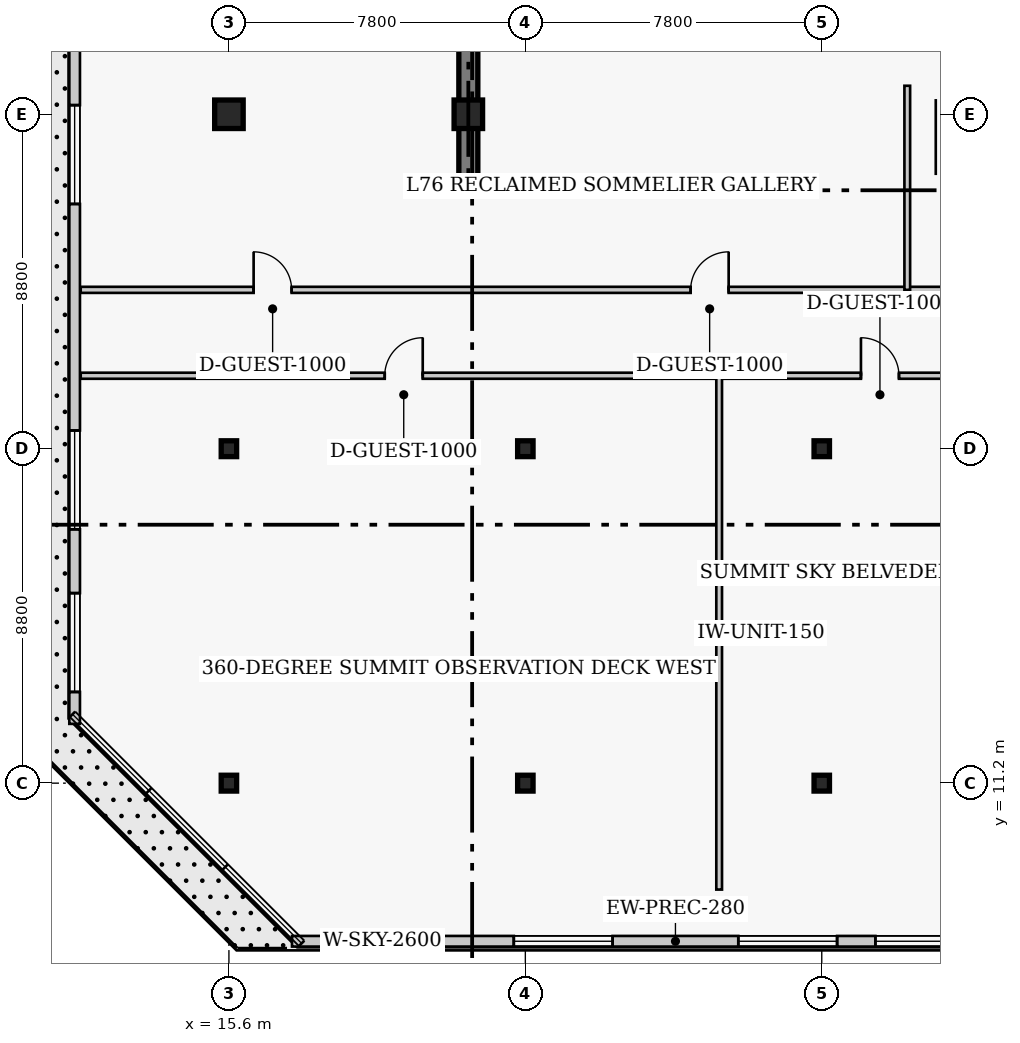
"""IFC4 building model, lengths in metres.
Left out: names, types, materials, properties, quantities, classifications, styles, units other than length and angle.
Written with IfcOpenShell. Run it as: python <this file> out.ifc"""

import sys

from ifc_helpers import new_model, si_unit, direction, frame, frame_2d, origin, origin_2d, place, context, subcontext, project, spatial, rectangle, i_section, extrude, element, fill, save


model = new_model("IFC4")
c1 = context("Model", 3, precision=1e-05, world=origin(), true_north=direction((0.0, 1.0)))
c2 = subcontext(c1, "Body", "Model", "MODEL_VIEW")
j1 = project(units=[si_unit("LENGTHUNIT", "METRE"), si_unit("PLANEANGLEUNIT", "RADIAN")], contexts=[c1])
p1 = place(None, origin())
s1 = spatial("IfcSite", under=j1, at=p1, CompositionType="ELEMENT")
p2 = place(p1, origin())
s2 = spatial("IfcBuilding", under=s1, at=p2, CompositionType="ELEMENT")
p3 = place(p2, frame((0.0, 0.0, 306.6)))
s3 = spatial("IfcBuildingStorey", under=s2, at=p3, CompositionType="ELEMENT", Elevation=306.6)
p4 = place(p3, frame((21.9, 27.05, 0.0), z_axis=(0.0, 0.0, 1.0), x_axis=(0.0, 1.0, 0.0)))
e1 = element("IfcWall", 1, at=p4, inside=s3, PredefinedType="SHEAR", context=c2, shape_type="SweptSolid", body=[
    extrude(rectangle(XDim=13.52, YDim=0.5, at=frame_2d((6.76, 0.0))), origin(), (0.0, 0.0, 1.0), 4.8),
])
for number, where, z_axis, x_axis in (
    (2, (15.6, 11.2, 0.0), (0.0, 0.0, 1.0), (1.0, 0.0, 0.0)),
    (3, (15.6, 20.0, 0.0), (0.0, 0.0, 1.0), (1.0, 0.0, 0.0)),
):
    element("IfcColumn", number, at=place(p3, frame(where, z_axis=z_axis, x_axis=x_axis)), inside=s3, PredefinedType="COLUMN", context=c2, shape_type="SweptSolid", body=[
        extrude(i_section(OverallWidth=0.406, OverallDepth=0.417, WebThickness=0.03, FlangeThickness=0.048, FilletRadius=0.017, at=origin_2d()), origin(), (0.0, 0.0, 1.0), 4.8),
    ])
p5 = place(p3, frame((15.6, 28.8, 0.0), z_axis=(0.0, 0.0, 1.0), x_axis=(1.0, 0.0, 0.0)))
e4 = element("IfcColumn", 4, at=p5, inside=s3, PredefinedType="COLUMN", context=c2, shape_type="SweptSolid", body=[
    extrude(rectangle(XDim=0.75, YDim=0.75, at=origin_2d()), origin(), (0.0, 0.0, 1.0), 4.8),
])
for number, where, z_axis, x_axis in (
    (5, (23.4, 11.2, 0.0), (0.0, 0.0, 1.0), (1.0, 0.0, 0.0)),
    (6, (23.4, 20.0, 0.0), (0.0, 0.0, 1.0), (1.0, 0.0, 0.0)),
    (7, (31.2, 11.2, 0.0), (0.0, 0.0, 1.0), (1.0, 0.0, 0.0)),
    (8, (31.2, 20.0, 0.0), (0.0, 0.0, 1.0), (1.0, 0.0, 0.0)),
):
    element("IfcColumn", number, at=place(p3, frame(where, z_axis=z_axis, x_axis=x_axis)), inside=s3, PredefinedType="COLUMN", context=c2, shape_type="SweptSolid", body=[
        extrude(i_section(OverallWidth=0.406, OverallDepth=0.417, WebThickness=0.03, FlangeThickness=0.048, FilletRadius=0.017, at=origin_2d()), origin(), (0.0, 0.0, 1.0), 4.8),
    ])
p6 = place(p3, frame((21.9, 28.8, 0.0), z_axis=(0.0, 0.0, 1.0), x_axis=(1.0, 0.0, 0.0)))
e9 = element("IfcColumn", 9, at=p6, inside=s3, PredefinedType="COLUMN", context=c2, shape_type="SweptSolid", body=[
    extrude(rectangle(XDim=0.75, YDim=0.75, at=origin_2d()), origin(), (0.0, 0.0, 1.0), 4.8),
])
p7 = place(p3, frame((17.26, 7.04, 0.0), z_axis=(0.0, 0.0, 1.0), x_axis=(1.0, 0.0, 0.0)))
e10 = element("IfcWall", 10, at=p7, inside=s3, PredefinedType="SOLIDWALL", context=c2, shape_type="SweptSolid", body=[
    extrude(rectangle(XDim=19.03, YDim=0.28, at=frame_2d((9.515, 0.0))), origin(), (0.0, 0.0, 1.0), 4.45),
])
p8 = place(p7, frame((1.079, 0.0, 0.65)))
e11 = element("IfcOpeningElement", 11, at=p8, cuts=e10, PredefinedType="OPENING", context=c2, shape_type="SweptSolid", body=[
    extrude(rectangle(XDim=2.6, YDim=2.2, at=frame_2d((1.3, 1.1))), frame((0.0, 0.15, 0.0), z_axis=(0.0, -1.0, 0.0), x_axis=(1.0, 0.0, 0.0)), (0.0, 0.0, 1.0), 0.3),
])
p9 = place(p7, frame((5.836, 0.0, 0.65)))
e12 = element("IfcOpeningElement", 12, at=p9, cuts=e10, PredefinedType="OPENING", context=c2, shape_type="SweptSolid", body=[
    extrude(rectangle(XDim=2.6, YDim=2.2, at=frame_2d((1.3, 1.1))), frame((0.0, 0.15, 0.0), z_axis=(0.0, -1.0, 0.0), x_axis=(1.0, 0.0, 0.0)), (0.0, 0.0, 1.0), 0.3),
])
p10 = place(p7, frame((11.744, 0.0, 0.65)))
e13 = element("IfcOpeningElement", 13, at=p10, cuts=e10, PredefinedType="OPENING", context=c2, shape_type="SweptSolid", body=[
    extrude(rectangle(XDim=2.6, YDim=2.2, at=frame_2d((1.3, 1.1))), frame((0.0, 0.15, 0.0), z_axis=(0.0, -1.0, 0.0), x_axis=(1.0, 0.0, 0.0)), (0.0, 0.0, 1.0), 0.3),
])
p11 = place(p7, frame((15.351, 0.0, 0.65)))
e14 = element("IfcOpeningElement", 14, at=p11, cuts=e10, PredefinedType="OPENING", context=c2, shape_type="SweptSolid", body=[
    extrude(rectangle(XDim=2.6, YDim=2.2, at=frame_2d((1.3, 1.1))), frame((0.0, 0.15, 0.0), z_axis=(0.0, -1.0, 0.0), x_axis=(1.0, 0.0, 0.0)), (0.0, 0.0, 1.0), 0.3),
])
p12 = place(p3, frame((11.54, 38.44, 0.0), z_axis=(0.0, 0.0, 1.0), x_axis=(0.0, -1.0, 0.0)))
e15 = element("IfcWall", 15, at=p12, inside=s3, PredefinedType="SOLIDWALL", context=c2, shape_type="SweptSolid", body=[
    extrude(rectangle(XDim=25.68, YDim=0.28, at=frame_2d((12.84, 0.0))), origin(), (0.0, 0.0, 1.0), 4.45),
])
p13 = place(p12, frame((0.84, 0.0, 0.65)))
e16 = element("IfcOpeningElement", 16, at=p13, cuts=e15, PredefinedType="OPENING", context=c2, shape_type="SweptSolid", body=[
    extrude(rectangle(XDim=2.6, YDim=2.2, at=frame_2d((1.3, 1.1))), frame((0.0, 0.15, 0.0), z_axis=(0.0, -1.0, 0.0), x_axis=(1.0, 0.0, 0.0)), (0.0, 0.0, 1.0), 0.3),
])
p14 = place(p12, frame((5.12, 0.0, 0.65)))
e17 = element("IfcOpeningElement", 17, at=p14, cuts=e15, PredefinedType="OPENING", context=c2, shape_type="SweptSolid", body=[
    extrude(rectangle(XDim=2.6, YDim=2.2, at=frame_2d((1.3, 1.1))), frame((0.0, 0.15, 0.0), z_axis=(0.0, -1.0, 0.0), x_axis=(1.0, 0.0, 0.0)), (0.0, 0.0, 1.0), 0.3),
])
p15 = place(p12, frame((9.4, 0.0, 0.65)))
e18 = element("IfcOpeningElement", 18, at=p15, cuts=e15, PredefinedType="OPENING", context=c2, shape_type="SweptSolid", body=[
    extrude(rectangle(XDim=2.6, YDim=2.2, at=frame_2d((1.3, 1.1))), frame((0.0, 0.15, 0.0), z_axis=(0.0, -1.0, 0.0), x_axis=(1.0, 0.0, 0.0)), (0.0, 0.0, 1.0), 0.3),
])
p16 = place(p12, frame((17.96, 0.0, 0.65)))
e19 = element("IfcOpeningElement", 19, at=p16, cuts=e15, PredefinedType="OPENING", context=c2, shape_type="SweptSolid", body=[
    extrude(rectangle(XDim=2.6, YDim=2.2, at=frame_2d((1.3, 1.1))), frame((0.0, 0.15, 0.0), z_axis=(0.0, -1.0, 0.0), x_axis=(1.0, 0.0, 0.0)), (0.0, 0.0, 1.0), 0.3),
])
p17 = place(p12, frame((22.24, 0.0, 0.65)))
e20 = element("IfcOpeningElement", 20, at=p17, cuts=e15, PredefinedType="OPENING", context=c2, shape_type="SweptSolid", body=[
    extrude(rectangle(XDim=2.6, YDim=2.2, at=frame_2d((1.3, 1.1))), frame((0.0, 0.15, 0.0), z_axis=(0.0, -1.0, 0.0), x_axis=(1.0, 0.0, 0.0)), (0.0, 0.0, 1.0), 0.3),
])
p18 = place(p3, frame((11.7, 21.92, 0.0), z_axis=(0.0, 0.0, 1.0), x_axis=(1.0, 0.0, 0.0)))
e21 = element("IfcWall", 21, at=p18, inside=s3, PredefinedType="PARTITIONING", context=c2, shape_type="SweptSolid", body=[
    extrude(rectangle(XDim=54.6, YDim=0.16, at=frame_2d((27.3, 0.0))), origin(), (0.0, 0.0, 1.0), 4.45),
])
p19 = place(p18, frame((8.0, 0.0, 0.0)))
e22 = element("IfcOpeningElement", 22, at=p19, cuts=e21, PredefinedType="OPENING", context=c2, shape_type="SweptSolid", body=[
    extrude(rectangle(XDim=1.0, YDim=2.15, at=frame_2d((0.5, 1.075))), frame((0.0, 0.09, 0.0), z_axis=(0.0, -1.0, 0.0), x_axis=(1.0, 0.0, 0.0)), (0.0, 0.0, 1.0), 0.18),
])
p20 = place(p18, frame((20.531, 0.0, 0.0)))
e23 = element("IfcOpeningElement", 23, at=p20, cuts=e21, PredefinedType="OPENING", context=c2, shape_type="SweptSolid", body=[
    extrude(rectangle(XDim=1.0, YDim=2.15, at=frame_2d((0.5, 1.075))), frame((0.0, 0.09, 0.0), z_axis=(0.0, -1.0, 0.0), x_axis=(1.0, 0.0, 0.0)), (0.0, 0.0, 1.0), 0.18),
])
p21 = place(p18, frame((36.569, 0.0, 0.0)))
e24 = element("IfcOpeningElement", 24, at=p21, cuts=e21, PredefinedType="OPENING", context=c2, shape_type="SweptSolid", body=[
    extrude(rectangle(XDim=1.0, YDim=2.15, at=frame_2d((0.5, 1.075))), frame((0.0, 0.09, 0.0), z_axis=(0.0, -1.0, 0.0), x_axis=(1.0, 0.0, 0.0)), (0.0, 0.0, 1.0), 0.18),
])
p22 = place(p3, frame((11.7, 24.18, 0.0), z_axis=(0.0, 0.0, 1.0), x_axis=(1.0, 0.0, 0.0)))
e25 = element("IfcWall", 25, at=p22, inside=s3, PredefinedType="PARTITIONING", context=c2, shape_type="SweptSolid", body=[
    extrude(rectangle(XDim=54.6, YDim=0.16, at=frame_2d((27.3, 0.0))), origin(), (0.0, 0.0, 1.0), 4.45),
])
p23 = place(p22, frame((25.4, 0.0, 0.0)))
e26 = element("IfcOpeningElement", 26, at=p23, cuts=e25, PredefinedType="OPENING", context=c2, shape_type="SweptSolid", body=[
    extrude(rectangle(XDim=1.8, YDim=2.2, at=frame_2d((0.9, 1.1))), frame((0.0, 0.09, 0.0), z_axis=(0.0, -1.0, 0.0), x_axis=(1.0, 0.0, 0.0)), (0.0, 0.0, 1.0), 0.18),
])
p24 = place(p22, frame((16.05, 0.0, 0.0)))
e27 = element("IfcOpeningElement", 27, at=p24, cuts=e25, PredefinedType="OPENING", context=c2, shape_type="SweptSolid", body=[
    extrude(rectangle(XDim=1.0, YDim=2.15, at=frame_2d((0.5, 1.075))), frame((0.0, 0.09, 0.0), z_axis=(0.0, -1.0, 0.0), x_axis=(1.0, 0.0, 0.0)), (0.0, 0.0, 1.0), 0.18),
])
p25 = place(p22, frame((33.3, 0.0, 0.0)))
e28 = element("IfcOpeningElement", 28, at=p25, cuts=e25, PredefinedType="OPENING", context=c2, shape_type="SweptSolid", body=[
    extrude(rectangle(XDim=1.0, YDim=2.15, at=frame_2d((0.5, 1.075))), frame((0.0, 0.09, 0.0), z_axis=(0.0, -1.0, 0.0), x_axis=(1.0, 0.0, 0.0)), (0.0, 0.0, 1.0), 0.18),
])
p26 = place(p22, frame((4.55, 0.0, 0.0)))
e29 = element("IfcOpeningElement", 29, at=p26, cuts=e25, PredefinedType="OPENING", context=c2, shape_type="SweptSolid", body=[
    extrude(rectangle(XDim=1.0, YDim=2.15, at=frame_2d((0.5, 1.075))), frame((0.0, 0.09, 0.0), z_axis=(0.0, -1.0, 0.0), x_axis=(1.0, 0.0, 0.0)), (0.0, 0.0, 1.0), 0.18),
])
p27 = place(p22, frame((46.91, 0.0, 0.0)))
e30 = element("IfcOpeningElement", 30, at=p27, cuts=e25, PredefinedType="OPENING", context=c2, shape_type="SweptSolid", body=[
    extrude(rectangle(XDim=0.88, YDim=2.05, at=frame_2d((0.44, 1.025))), frame((0.0, 0.09, 0.0), z_axis=(0.0, -1.0, 0.0), x_axis=(1.0, 0.0, 0.0)), (0.0, 0.0, 1.0), 0.18),
])
p28 = place(p22, frame((49.15, 0.0, 0.0)))
e31 = element("IfcOpeningElement", 31, at=p28, cuts=e25, PredefinedType="OPENING", context=c2, shape_type="SweptSolid", body=[
    extrude(rectangle(XDim=1.0, YDim=2.15, at=frame_2d((0.5, 1.075))), frame((0.0, 0.09, 0.0), z_axis=(0.0, -1.0, 0.0), x_axis=(1.0, 0.0, 0.0)), (0.0, 0.0, 1.0), 0.18),
])
p29 = place(p3, frame((33.45, 24.18, 0.0), z_axis=(0.0, 0.0, 1.0), x_axis=(0.0, 1.0, 0.0)))
e32 = element("IfcWall", 32, at=p29, inside=s3, PredefinedType="PARTITIONING", context=c2, shape_type="SweptSolid", body=[
    extrude(rectangle(XDim=5.37, YDim=0.15, at=frame_2d((2.685, 0.0))), origin(), (0.0, 0.0, 1.0), 4.45),
])
p30 = place(p3, frame((28.5, 8.4, 0.0), z_axis=(0.0, 0.0, 1.0), x_axis=(0.0, 1.0, 0.0)))
e33 = element("IfcWall", 33, at=p30, inside=s3, PredefinedType="PARTITIONING", context=c2, shape_type="SweptSolid", body=[
    extrude(rectangle(XDim=13.52, YDim=0.15, at=frame_2d((6.76, 0.0))), origin(), (0.0, 0.0, 1.0), 4.45),
])
p31 = place(p8, origin())
e34 = element("IfcWindow", 34, at=p31, inside=s3, PartitioningType="SINGLE_PANEL", PredefinedType="WINDOW", context=c2, shape_type="SweptSolid", body=[
    extrude(rectangle(XDim=2.6, YDim=2.2, at=frame_2d((1.3, 1.1))), frame((0.0, 0.03, 0.0), z_axis=(0.0, -1.0, 0.0), x_axis=(1.0, 0.0, 0.0)), (0.0, 0.0, 1.0), 0.06),
])
fill(e11, e34)
p32 = place(p9, origin())
e35 = element("IfcWindow", 35, at=p32, inside=s3, PartitioningType="SINGLE_PANEL", PredefinedType="WINDOW", context=c2, shape_type="SweptSolid", body=[
    extrude(rectangle(XDim=2.6, YDim=2.2, at=frame_2d((1.3, 1.1))), frame((0.0, 0.03, 0.0), z_axis=(0.0, -1.0, 0.0), x_axis=(1.0, 0.0, 0.0)), (0.0, 0.0, 1.0), 0.06),
])
fill(e12, e35)
p33 = place(p10, origin())
e36 = element("IfcWindow", 36, at=p33, inside=s3, PartitioningType="SINGLE_PANEL", PredefinedType="WINDOW", context=c2, shape_type="SweptSolid", body=[
    extrude(rectangle(XDim=2.6, YDim=2.2, at=frame_2d((1.3, 1.1))), frame((0.0, 0.03, 0.0), z_axis=(0.0, -1.0, 0.0), x_axis=(1.0, 0.0, 0.0)), (0.0, 0.0, 1.0), 0.06),
])
fill(e13, e36)
p34 = place(p11, origin())
e37 = element("IfcWindow", 37, at=p34, inside=s3, PartitioningType="SINGLE_PANEL", PredefinedType="WINDOW", context=c2, shape_type="SweptSolid", body=[
    extrude(rectangle(XDim=2.6, YDim=2.2, at=frame_2d((1.3, 1.1))), frame((0.0, 0.03, 0.0), z_axis=(0.0, -1.0, 0.0), x_axis=(1.0, 0.0, 0.0)), (0.0, 0.0, 1.0), 0.06),
])
fill(e14, e37)
p35 = place(p15, origin())
e38 = element("IfcWindow", 38, at=p35, inside=s3, PartitioningType="SINGLE_PANEL", PredefinedType="WINDOW", context=c2, shape_type="SweptSolid", body=[
    extrude(rectangle(XDim=2.6, YDim=2.2, at=frame_2d((1.3, 1.1))), frame((0.0, 0.03, 0.0), z_axis=(0.0, -1.0, 0.0), x_axis=(1.0, 0.0, 0.0)), (0.0, 0.0, 1.0), 0.06),
])
fill(e18, e38)
p36 = place(p16, origin())
e39 = element("IfcWindow", 39, at=p36, inside=s3, PartitioningType="SINGLE_PANEL", PredefinedType="WINDOW", context=c2, shape_type="SweptSolid", body=[
    extrude(rectangle(XDim=2.6, YDim=2.2, at=frame_2d((1.3, 1.1))), frame((0.0, 0.03, 0.0), z_axis=(0.0, -1.0, 0.0), x_axis=(1.0, 0.0, 0.0)), (0.0, 0.0, 1.0), 0.06),
])
fill(e19, e39)
p37 = place(p17, origin())
e40 = element("IfcWindow", 40, at=p37, inside=s3, PartitioningType="SINGLE_PANEL", PredefinedType="WINDOW", context=c2, shape_type="SweptSolid", body=[
    extrude(rectangle(XDim=2.6, YDim=2.2, at=frame_2d((1.3, 1.1))), frame((0.0, 0.03, 0.0), z_axis=(0.0, -1.0, 0.0), x_axis=(1.0, 0.0, 0.0)), (0.0, 0.0, 1.0), 0.06),
])
fill(e20, e40)
p38 = place(p24, origin())
e41 = element("IfcDoor", 41, at=p38, inside=s3, OperationType="SINGLE_SWING_RIGHT", PredefinedType="DOOR", context=c2, shape_type="SweptSolid", body=[
    extrude(rectangle(XDim=1.0, YDim=2.15, at=frame_2d((0.5, 1.075))), frame((0.0, 0.025, 0.0), z_axis=(0.0, -1.0, 0.0), x_axis=(1.0, 0.0, 0.0)), (0.0, 0.0, 1.0), 0.05),
])
fill(e27, e41)
p39 = place(p19, origin())
e42 = element("IfcDoor", 42, at=p39, inside=s3, OperationType="SINGLE_SWING_RIGHT", PredefinedType="DOOR", context=c2, shape_type="SweptSolid", body=[
    extrude(rectangle(XDim=1.0, YDim=2.15, at=frame_2d((0.5, 1.075))), frame((0.0, 0.025, 0.0), z_axis=(0.0, -1.0, 0.0), x_axis=(1.0, 0.0, 0.0)), (0.0, 0.0, 1.0), 0.05),
])
fill(e22, e42)
p40 = place(p20, origin())
e43 = element("IfcDoor", 43, at=p40, inside=s3, OperationType="SINGLE_SWING_LEFT", PredefinedType="DOOR", context=c2, shape_type="SweptSolid", body=[
    extrude(rectangle(XDim=1.0, YDim=2.15, at=frame_2d((0.5, 1.075))), frame((0.0, 0.025, 0.0), z_axis=(0.0, -1.0, 0.0), x_axis=(1.0, 0.0, 0.0)), (0.0, 0.0, 1.0), 0.05),
])
fill(e23, e43)
p41 = place(p26, origin())
e44 = element("IfcDoor", 44, at=p41, inside=s3, OperationType="SINGLE_SWING_LEFT", PredefinedType="DOOR", context=c2, shape_type="SweptSolid", body=[
    extrude(rectangle(XDim=1.0, YDim=2.15, at=frame_2d((0.5, 1.075))), frame((0.0, 0.025, 0.0), z_axis=(0.0, -1.0, 0.0), x_axis=(1.0, 0.0, 0.0)), (0.0, 0.0, 1.0), 0.05),
])
fill(e29, e44)
save(model, sys.argv[1])
